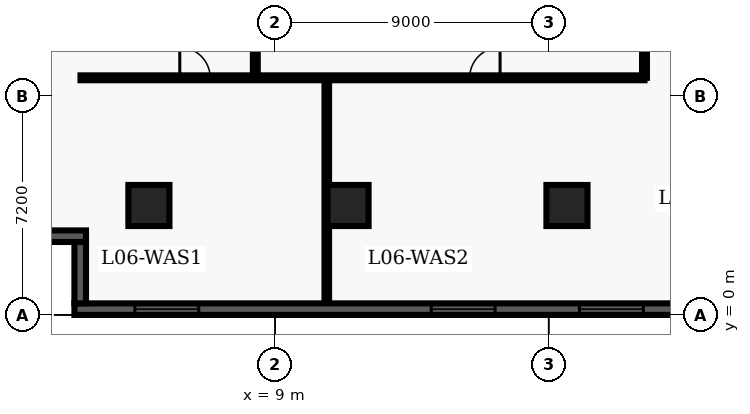
"""IFC4 building model, lengths in metres.
Left out: names, types, materials, properties, quantities, classifications, styles, units other than length and angle.
Written with IfcOpenShell. Run it as: python <this file> out.ifc"""

import sys

from ifc_helpers import new_model, entity, si_unit, converted_unit, direction, frame, origin_with_axes, origin_2d_with_axis, place, context, subcontext, project, spatial, polyline, rectangle, outline, extrude, element, fill, save


model = new_model("IFC4")
c1 = context("Model", 3, precision=1e-05, world=origin_with_axes(), true_north=direction((0.0, 1.0)))
c2 = subcontext(c1, "Body", "Model", "MODEL_VIEW")
j1 = project(units=[si_unit("LENGTHUNIT", "METRE"), converted_unit("PLANEANGLEUNIT", "DEGREE", entity("IfcPlaneAngleMeasure", 0.017), si_unit("PLANEANGLEUNIT", "RADIAN"), dimensions=[0, 0, 0, 0, 0, 0, 0])], contexts=[c1])
p1 = place(None, origin_with_axes())
s1 = spatial("IfcSite", under=j1, at=p1, CompositionType="ELEMENT")
p2 = place(p1, origin_with_axes())
s2 = spatial("IfcBuilding", under=s1, at=p2, CompositionType="ELEMENT")
p3 = place(p2, frame((0.0, 0.0, 28.8), z_axis=(0.0, 0.0, 1.0), x_axis=(1.0, 0.0, 0.0)))
s3 = spatial("IfcBuildingStorey", under=s2, at=p3, CompositionType="ELEMENT", Elevation=28.8)
for number, where, z_axis, x_axis in (
    (1, (11.4, 3.6, 0.0), (0.0, 0.0, 1.0), (1.0, 0.0, 0.0)),
    (2, (18.6, 3.6, 0.0), (0.0, 0.0, 1.0), (1.0, 0.0, 0.0)),
    (3, (4.85, 3.6, 0.0), (0.0, 0.0, 1.0), (1.0, 0.0, 0.0)),
):
    element("IfcColumn", number, at=place(p3, frame(where, z_axis=z_axis, x_axis=x_axis)), inside=s3, PredefinedType="COLUMN", context=c2, shape_type="SweptSolid", body=[
        extrude(rectangle(XDim=1.35, YDim=1.35, at=origin_2d_with_axis()), origin_with_axes(), (0.0, 0.0, 1.0), 3.9),
    ])
p4 = place(p3, frame((2.6, 7.8, 0.0), z_axis=(0.0, 0.0, 1.0), x_axis=(1.0, 0.0, 0.0)))
e4 = element("IfcWall", 4, at=p4, inside=s3, PredefinedType="PARTITIONING", context=c2, shape_type="SweptSolid", body=[
    extrude(outline(polyline([(0.0, -0.08), (18.55, -0.08), (18.55, 0.08), (0.0, 0.08), (0.0, -0.08)])), origin_with_axes(), (0.0, 0.0, 1.0), 2.7),
])
p5 = place(p4, frame((3.765, 0.0, 0.0), z_axis=(0.0, 0.0, 1.0), x_axis=(1.0, 0.0, 0.0)))
e5 = element("IfcOpeningElement", 5, at=p5, cuts=e4, PredefinedType="OPENING", context=c2, shape_type="SweptSolid", body=[
    extrude(rectangle(XDim=1.0, YDim=0.18, at=origin_2d_with_axis()), origin_with_axes(), (0.0, 0.0, 1.0), 2.15),
])
p6 = place(p4, frame((13.3, 0.0, 0.0), z_axis=(0.0, 0.0, 1.0), x_axis=(1.0, 0.0, 0.0)))
e6 = element("IfcOpeningElement", 6, at=p6, cuts=e4, PredefinedType="OPENING", context=c2, shape_type="SweptSolid", body=[
    extrude(rectangle(XDim=1.0, YDim=0.18, at=origin_2d_with_axis()), origin_with_axes(), (0.0, 0.0, 1.0), 2.15),
])
p7 = place(p3, frame((21.15, 7.8, 0.0), z_axis=(0.0, 0.0, 1.0), x_axis=(0.0, 1.0, 0.0)))
e7 = element("IfcWall", 7, at=p7, inside=s3, PredefinedType="PARTITIONING", context=c2, shape_type="SweptSolid", body=[
    extrude(outline(polyline([(0.0, -0.08), (30.2, -0.08), (30.2, 0.08), (0.0, 0.08), (0.0, -0.08)])), origin_with_axes(), (0.0, 0.0, 1.0), 2.7),
])
p8 = place(p7, frame((5.775, 0.0, 0.0), z_axis=(0.0, 0.0, 1.0), x_axis=(1.0, 0.0, 0.0)))
e8 = element("IfcOpeningElement", 8, at=p8, cuts=e7, PredefinedType="OPENING", context=c2, shape_type="SweptSolid", body=[
    extrude(rectangle(XDim=1.05, YDim=0.18, at=origin_2d_with_axis()), origin_with_axes(), (0.0, 0.0, 1.0), 2.15),
])
p9 = place(p3, frame((8.35, 7.8, 0.0), z_axis=(0.0, 0.0, 1.0), x_axis=(0.0, 1.0, 0.0)))
e9 = element("IfcWall", 9, at=p9, inside=s3, PredefinedType="PARTITIONING", context=c2, shape_type="SweptSolid", body=[
    extrude(outline(polyline([(0.0, -0.08), (12.6, -0.08), (12.6, 0.08), (0.0, 0.08), (0.0, -0.08)])), origin_with_axes(), (0.0, 0.0, 1.0), 2.7),
])
p10 = place(p9, frame((6.325, 0.0, 0.0), z_axis=(0.0, 0.0, 1.0), x_axis=(1.0, 0.0, 0.0)))
e10 = element("IfcOpeningElement", 10, at=p10, cuts=e9, PredefinedType="OPENING", context=c2, shape_type="SweptSolid", body=[
    extrude(rectangle(XDim=1.0, YDim=0.18, at=origin_2d_with_axis()), origin_with_axes(), (0.0, 0.0, 1.0), 2.15),
])
p11 = place(p3, frame((10.7, 0.36, 0.0), z_axis=(0.0, 0.0, 1.0), x_axis=(0.0, 1.0, 0.0)))
e11 = element("IfcWall", 11, at=p11, inside=s3, PredefinedType="PARTITIONING", context=c2, shape_type="SweptSolid", body=[
    extrude(outline(polyline([(0.0, -0.075), (7.34, -0.075), (7.34, 0.075), (0.0, 0.075), (0.0, -0.075)])), origin_with_axes(), (0.0, 0.0, 1.0), 2.7),
])
p12 = place(p3, frame((57.22, 0.19, 0.0), z_axis=(0.0, 0.0, 1.0), x_axis=(-1.0, 0.0, 0.0)))
e12 = element("IfcWall", 12, at=p12, inside=s3, PredefinedType="SOLIDWALL", context=c2, shape_type="SweptSolid", body=[
    extrude(outline(polyline([(0.0, -0.19), (54.82, -0.19), (54.82, 0.19), (0.0, 0.19), (0.0, -0.19)])), origin_with_axes(), (0.0, 0.0, 1.0), 3.66),
])
p13 = place(p12, frame((3.037, 0.0, 0.45), z_axis=(0.0, 0.0, 1.0), x_axis=(1.0, 0.0, 0.0)))
e13 = element("IfcOpeningElement", 13, at=p13, cuts=e12, PredefinedType="OPENING", context=c2, shape_type="SweptSolid", body=[
    extrude(rectangle(XDim=2.1, YDim=0.4, at=origin_2d_with_axis()), origin_with_axes(), (0.0, 0.0, 1.0), 2.2),
])
p14 = place(p12, frame((7.912, 0.0, 0.45), z_axis=(0.0, 0.0, 1.0), x_axis=(1.0, 0.0, 0.0)))
e14 = element("IfcOpeningElement", 14, at=p14, cuts=e12, PredefinedType="OPENING", context=c2, shape_type="SweptSolid", body=[
    extrude(rectangle(XDim=2.1, YDim=0.4, at=origin_2d_with_axis()), origin_with_axes(), (0.0, 0.0, 1.0), 2.2),
])
p15 = place(p12, frame((12.786, 0.0, 0.45), z_axis=(0.0, 0.0, 1.0), x_axis=(1.0, 0.0, 0.0)))
e15 = element("IfcOpeningElement", 15, at=p15, cuts=e12, PredefinedType="OPENING", context=c2, shape_type="SweptSolid", body=[
    extrude(rectangle(XDim=2.1, YDim=0.4, at=origin_2d_with_axis()), origin_with_axes(), (0.0, 0.0, 1.0), 2.2),
])
p16 = place(p12, frame((17.661, 0.0, 0.45), z_axis=(0.0, 0.0, 1.0), x_axis=(1.0, 0.0, 0.0)))
e16 = element("IfcOpeningElement", 16, at=p16, cuts=e12, PredefinedType="OPENING", context=c2, shape_type="SweptSolid", body=[
    extrude(rectangle(XDim=2.1, YDim=0.4, at=origin_2d_with_axis()), origin_with_axes(), (0.0, 0.0, 1.0), 2.2),
])
p17 = place(p12, frame((22.535, 0.0, 0.45), z_axis=(0.0, 0.0, 1.0), x_axis=(1.0, 0.0, 0.0)))
e17 = element("IfcOpeningElement", 17, at=p17, cuts=e12, PredefinedType="OPENING", context=c2, shape_type="SweptSolid", body=[
    extrude(rectangle(XDim=2.1, YDim=0.4, at=origin_2d_with_axis()), origin_with_axes(), (0.0, 0.0, 1.0), 2.2),
])
p18 = place(p12, frame((27.41, 0.0, 0.45), z_axis=(0.0, 0.0, 1.0), x_axis=(1.0, 0.0, 0.0)))
e18 = element("IfcOpeningElement", 18, at=p18, cuts=e12, PredefinedType="OPENING", context=c2, shape_type="SweptSolid", body=[
    extrude(rectangle(XDim=2.1, YDim=0.4, at=origin_2d_with_axis()), origin_with_axes(), (0.0, 0.0, 1.0), 2.2),
])
p19 = place(p12, frame((32.285, 0.0, 0.45), z_axis=(0.0, 0.0, 1.0), x_axis=(1.0, 0.0, 0.0)))
e19 = element("IfcOpeningElement", 19, at=p19, cuts=e12, PredefinedType="OPENING", context=c2, shape_type="SweptSolid", body=[
    extrude(rectangle(XDim=2.1, YDim=0.4, at=origin_2d_with_axis()), origin_with_axes(), (0.0, 0.0, 1.0), 2.2),
])
p20 = place(p12, frame((37.159, 0.0, 0.45), z_axis=(0.0, 0.0, 1.0), x_axis=(1.0, 0.0, 0.0)))
e20 = element("IfcOpeningElement", 20, at=p20, cuts=e12, PredefinedType="OPENING", context=c2, shape_type="SweptSolid", body=[
    extrude(rectangle(XDim=2.1, YDim=0.4, at=origin_2d_with_axis()), origin_with_axes(), (0.0, 0.0, 1.0), 2.2),
])
p21 = place(p12, frame((42.034, 0.0, 0.45), z_axis=(0.0, 0.0, 1.0), x_axis=(1.0, 0.0, 0.0)))
e21 = element("IfcOpeningElement", 21, at=p21, cuts=e12, PredefinedType="OPENING", context=c2, shape_type="SweptSolid", body=[
    extrude(rectangle(XDim=2.1, YDim=0.4, at=origin_2d_with_axis()), origin_with_axes(), (0.0, 0.0, 1.0), 2.2),
])
p22 = place(p12, frame((51.783, 0.0, 0.45), z_axis=(0.0, 0.0, 1.0), x_axis=(1.0, 0.0, 0.0)))
e22 = element("IfcOpeningElement", 22, at=p22, cuts=e12, PredefinedType="OPENING", context=c2, shape_type="SweptSolid", body=[
    extrude(rectangle(XDim=2.1, YDim=0.4, at=origin_2d_with_axis()), origin_with_axes(), (0.0, 0.0, 1.0), 2.2),
])
p23 = place(p3, frame((2.59, 0.38, 0.0), z_axis=(0.0, 0.0, 1.0), x_axis=(0.0, 1.0, 0.0)))
e23 = element("IfcWall", 23, at=p23, inside=s3, PredefinedType="SOLIDWALL", context=c2, shape_type="SweptSolid", body=[
    extrude(outline(polyline([(0.0, -0.19), (2.02, -0.19), (2.02, 0.19), (0.0, 0.19), (0.0, -0.19)])), origin_with_axes(), (0.0, 0.0, 1.0), 3.66),
])
p24 = place(p3, frame((2.78, 2.59, 0.0), z_axis=(0.0, 0.0, 1.0), x_axis=(-1.0, 0.0, 0.0)))
e24 = element("IfcWall", 24, at=p24, inside=s3, PredefinedType="SOLIDWALL", context=c2, shape_type="SweptSolid", body=[
    extrude(outline(polyline([(0.0, -0.19), (2.78, -0.19), (2.78, 0.19), (0.0, 0.19), (0.0, -0.19)])), origin_with_axes(), (0.0, 0.0, 1.0), 3.66),
])
p25 = place(p4, frame((3.765, 0.0, 0.0), z_axis=(0.0, 0.0, 1.0), x_axis=(1.0, 0.0, 0.0)))
e25 = element("IfcDoor", 25, at=p25, inside=s3, OperationType="SINGLE_SWING_LEFT", PredefinedType="DOOR", context=c2, shape_type="SweptSolid", body=[
    extrude(rectangle(XDim=1.0, YDim=0.09, at=origin_2d_with_axis()), origin_with_axes(), (0.0, 0.0, 1.0), 2.15),
])
fill(e5, e25)
p26 = place(p4, frame((13.3, 0.0, 0.0), z_axis=(0.0, 0.0, 1.0), x_axis=(1.0, 0.0, 0.0)))
e26 = element("IfcDoor", 26, at=p26, inside=s3, OperationType="SINGLE_SWING_RIGHT", PredefinedType="DOOR", context=c2, shape_type="SweptSolid", body=[
    extrude(rectangle(XDim=1.0, YDim=0.09, at=origin_2d_with_axis()), origin_with_axes(), (0.0, 0.0, 1.0), 2.15),
])
fill(e6, e26)
p27 = place(p12, frame((37.159, 0.0, 0.45), z_axis=(0.0, 0.0, 1.0), x_axis=(1.0, 0.0, 0.0)))
e27 = element("IfcWindow", 27, at=p27, inside=s3, PredefinedType="WINDOW", context=c2, shape_type="SweptSolid", body=[
    extrude(rectangle(XDim=2.1, YDim=0.09, at=origin_2d_with_axis()), origin_with_axes(), (0.0, 0.0, 1.0), 2.2),
])
fill(e20, e27)
p28 = place(p12, frame((42.034, 0.0, 0.45), z_axis=(0.0, 0.0, 1.0), x_axis=(1.0, 0.0, 0.0)))
e28 = element("IfcWindow", 28, at=p28, inside=s3, PredefinedType="WINDOW", context=c2, shape_type="SweptSolid", body=[
    extrude(rectangle(XDim=2.1, YDim=0.09, at=origin_2d_with_axis()), origin_with_axes(), (0.0, 0.0, 1.0), 2.2),
])
fill(e21, e28)
p29 = place(p12, frame((51.783, 0.0, 0.45), z_axis=(0.0, 0.0, 1.0), x_axis=(1.0, 0.0, 0.0)))
e29 = element("IfcWindow", 29, at=p29, inside=s3, PredefinedType="WINDOW", context=c2, shape_type="SweptSolid", body=[
    extrude(rectangle(XDim=2.1, YDim=0.09, at=origin_2d_with_axis()), origin_with_axes(), (0.0, 0.0, 1.0), 2.2),
])
fill(e22, e29)
save(model, sys.argv[1])
